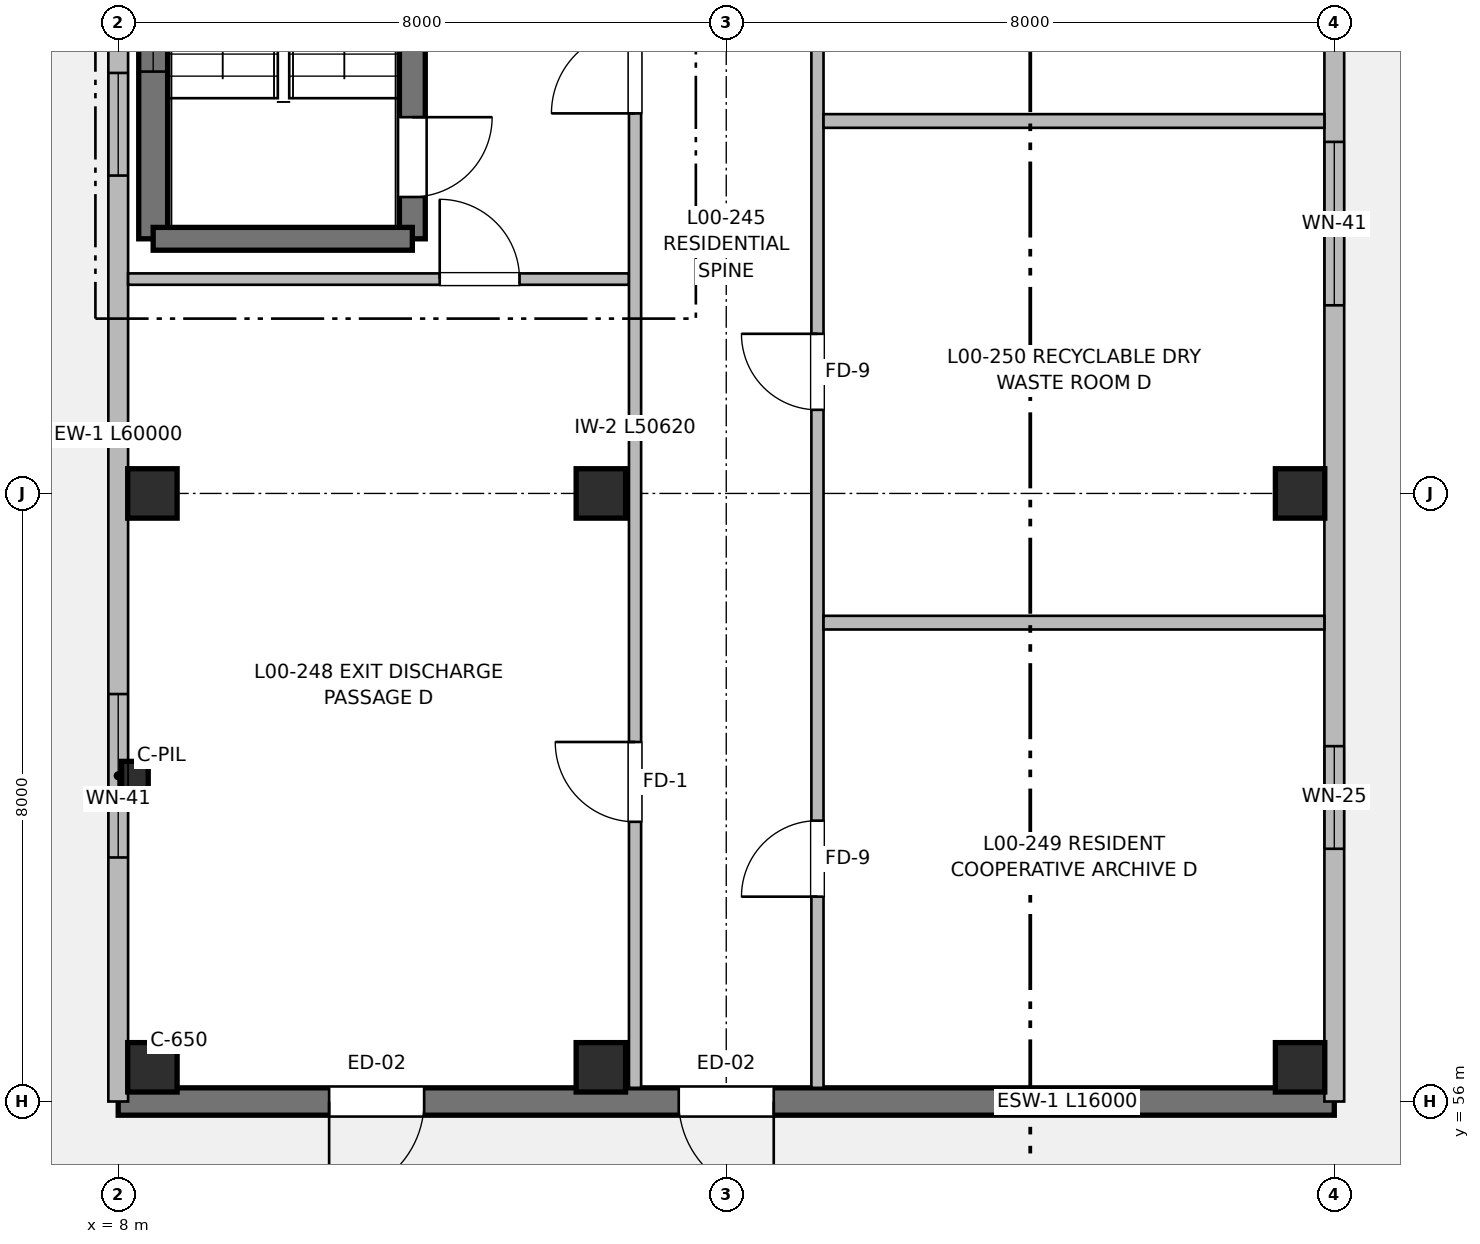
"""IFC4 building model, lengths in metres.
Left out: names, types, materials, properties, quantities, classifications, styles, units other than length and angle.
Written with IfcOpenShell. Run it as: python <this file> out.ifc"""

import sys

from ifc_helpers import new_model, si_unit, direction, frame, frame_2d, origin, origin_2d, place, context, subcontext, project, spatial, rectangle, extrude, element, fill, save


model = new_model("IFC4")
c1 = context("Model", 3, precision=1e-05, world=origin(), true_north=direction((0.0, 1.0)))
c2 = subcontext(c1, "Body", "Model", "MODEL_VIEW")
j1 = project(units=[si_unit("LENGTHUNIT", "METRE"), si_unit("PLANEANGLEUNIT", "RADIAN")], contexts=[c1])
p1 = place(None, origin())
s1 = spatial("IfcSite", under=j1, at=p1, CompositionType="ELEMENT")
p2 = place(p1, origin())
s2 = spatial("IfcBuilding", under=s1, at=p2, CompositionType="ELEMENT")
p3 = place(p2, origin())
s3 = spatial("IfcBuildingStorey", under=s2, at=p3, CompositionType="ELEMENT", Elevation=0.0)
p4 = place(p3, frame((8.22, 60.2, 0.0), z_axis=(0.0, 0.0, 1.0), x_axis=(1.0, 0.0, 0.0)))
e1 = element("IfcColumn", 1, at=p4, inside=s3, PredefinedType="PILASTER", context=c2, shape_type="SweptSolid", body=[
    extrude(rectangle(XDim=0.35, YDim=0.55, at=origin_2d()), origin(), (0.0, 0.0, 1.0), 4.16),
])
for number, where, z_axis, x_axis in (
    (2, (8.45, 56.45, 0.0), (0.0, 0.0, 1.0), (1.0, 0.0, 0.0)),
    (3, (8.45, 64.0, 0.0), (0.0, 0.0, 1.0), (1.0, 0.0, 0.0)),
    (4, (14.35, 56.45, 0.0), (0.0, 0.0, 1.0), (1.0, 0.0, 0.0)),
    (5, (14.35, 64.0, 0.0), (0.0, 0.0, 1.0), (1.0, 0.0, 0.0)),
    (6, (23.55, 56.45, 0.0), (0.0, 0.0, 1.0), (1.0, 0.0, 0.0)),
    (7, (23.55, 64.0, 0.0), (0.0, 0.0, 1.0), (1.0, 0.0, 0.0)),
):
    element("IfcColumn", number, at=place(p3, frame(where, z_axis=z_axis, x_axis=x_axis)), inside=s3, PredefinedType="COLUMN", context=c2, shape_type="SweptSolid", body=[
        extrude(rectangle(XDim=0.65, YDim=0.65, at=origin_2d()), origin(), (0.0, 0.0, 1.0), 4.16),
    ])
p5 = place(p3, frame((8.46, 67.35, 0.0), z_axis=(0.0, 0.0, 1.0), x_axis=(0.0, 1.0, 0.0)))
e8 = element("IfcWall", 8, at=p5, inside=s3, PredefinedType="SHEAR", context=c2, shape_type="SweptSolid", body=[
    extrude(rectangle(XDim=12.45, YDim=0.38, at=frame_2d((6.225, 0.0))), origin(), (0.0, 0.0, 1.0), 4.16),
])
p6 = place(p5, frame((2.2, 0.0, 1.2)))
e9 = element("IfcOpeningElement", 9, at=p6, cuts=e8, PredefinedType="OPENING", context=c2, shape_type="SweptSolid", body=[
    extrude(rectangle(XDim=0.95, YDim=1.25, at=frame_2d((0.475, 0.625))), frame((0.0, 0.2, 0.0), z_axis=(0.0, -1.0, 0.0), x_axis=(1.0, 0.0, 0.0)), (0.0, 0.0, 1.0), 0.4),
])
p7 = place(p3, frame((11.87, 79.8, 0.0), z_axis=(0.0, 0.0, 1.0), x_axis=(0.0, -1.0, 0.0)))
e10 = element("IfcWall", 10, at=p7, inside=s3, PredefinedType="SHEAR", context=c2, shape_type="SweptSolid", body=[
    extrude(rectangle(XDim=12.45, YDim=0.34, at=frame_2d((6.225, 0.0))), origin(), (0.0, 0.0, 1.0), 4.16),
])
p8 = place(p7, frame((10.85, 0.0, 0.0)))
e11 = element("IfcOpeningElement", 11, at=p8, cuts=e10, PredefinedType="OPENING", context=c2, shape_type="SweptSolid", body=[
    extrude(rectangle(XDim=1.05, YDim=2.15, at=frame_2d((0.525, 1.075))), frame((0.0, 0.18, 0.0), z_axis=(0.0, -1.0, 0.0), x_axis=(1.0, 0.0, 0.0)), (0.0, 0.0, 1.0), 0.36),
])
p9 = place(p3, frame((11.87, 67.35, 0.0), z_axis=(0.0, 0.0, 1.0), x_axis=(-1.0, 0.0, 0.0)))
e12 = element("IfcWall", 12, at=p9, inside=s3, PredefinedType="SHEAR", context=c2, shape_type="SweptSolid", body=[
    extrude(rectangle(XDim=3.41, YDim=0.3, at=frame_2d((1.705, 0.0))), origin(), (0.0, 0.0, 1.0), 4.16),
])
p10 = place(p3, frame((24.0, 56.0, 0.0), z_axis=(0.0, 0.0, 1.0), x_axis=(-1.0, 0.0, 0.0)))
e13 = element("IfcWall", 13, at=p10, inside=s3, PredefinedType="SHEAR", context=c2, shape_type="SweptSolid", body=[
    extrude(rectangle(XDim=16.0, YDim=0.36, at=frame_2d((8.0, 0.0))), origin(), (0.0, 0.0, 1.0), 3.94),
])
p11 = place(p10, frame((7.375, 0.0, 0.0)))
e14 = element("IfcOpeningElement", 14, at=p11, cuts=e13, PredefinedType="OPENING", context=c2, shape_type="SweptSolid", body=[
    extrude(rectangle(XDim=1.25, YDim=2.2, at=frame_2d((0.625, 1.1))), frame((0.0, 0.19, 0.0), z_axis=(0.0, -1.0, 0.0), x_axis=(1.0, 0.0, 0.0)), (0.0, 0.0, 1.0), 0.38),
])
p12 = place(p10, frame((11.975, 0.0, 0.0)))
e15 = element("IfcOpeningElement", 15, at=p12, cuts=e13, PredefinedType="OPENING", context=c2, shape_type="SweptSolid", body=[
    extrude(rectangle(XDim=1.25, YDim=2.2, at=frame_2d((0.625, 1.1))), frame((0.0, 0.19, 0.0), z_axis=(0.0, -1.0, 0.0), x_axis=(1.0, 0.0, 0.0)), (0.0, 0.0, 1.0), 0.38),
])
p13 = place(p3, frame((24.0, 88.0, 0.0), z_axis=(0.0, 0.0, 1.0), x_axis=(0.0, -1.0, 0.0)))
e16 = element("IfcWall", 16, at=p13, inside=s3, PredefinedType="SOLIDWALL", context=c2, shape_type="SweptSolid", body=[
    extrude(rectangle(XDim=32.0, YDim=0.26, at=frame_2d((16.0, 0.0))), origin(), (0.0, 0.0, 1.0), 3.94),
])
p14 = place(p13, frame((3.3, 0.0, 0.0)))
e17 = element("IfcOpeningElement", 17, at=p14, cuts=e16, PredefinedType="OPENING", context=c2, shape_type="SweptSolid", body=[
    extrude(rectangle(XDim=1.3, YDim=2.2, at=frame_2d((0.65, 1.1))), frame((0.0, 0.14, 0.0), z_axis=(0.0, -1.0, 0.0), x_axis=(1.0, 0.0, 0.0)), (0.0, 0.0, 1.0), 0.28),
])
p15 = place(p13, frame((10.875, 0.0, 0.95)))
e18 = element("IfcOpeningElement", 18, at=p15, cuts=e16, PredefinedType="OPENING", context=c2, shape_type="SweptSolid", body=[
    extrude(rectangle(XDim=1.35, YDim=1.3, at=frame_2d((0.675, 0.65))), frame((0.0, 0.14, 0.0), z_axis=(0.0, -1.0, 0.0), x_axis=(1.0, 0.0, 0.0)), (0.0, 0.0, 1.0), 0.28),
])
p16 = place(p13, frame((19.375, 0.0, 0.95)))
e19 = element("IfcOpeningElement", 19, at=p16, cuts=e16, PredefinedType="OPENING", context=c2, shape_type="SweptSolid", body=[
    extrude(rectangle(XDim=2.15, YDim=1.8, at=frame_2d((1.075, 0.9))), frame((0.0, 0.14, 0.0), z_axis=(0.0, -1.0, 0.0), x_axis=(1.0, 0.0, 0.0)), (0.0, 0.0, 1.0), 0.28),
])
p17 = place(p13, frame((27.325, 0.0, 0.95)))
e20 = element("IfcOpeningElement", 20, at=p17, cuts=e16, PredefinedType="OPENING", context=c2, shape_type="SweptSolid", body=[
    extrude(rectangle(XDim=1.35, YDim=1.3, at=frame_2d((0.675, 0.65))), frame((0.0, 0.14, 0.0), z_axis=(0.0, -1.0, 0.0), x_axis=(1.0, 0.0, 0.0)), (0.0, 0.0, 1.0), 0.28),
])
p18 = place(p3, frame((8.0, 56.0, 0.0), z_axis=(0.0, 0.0, 1.0), x_axis=(0.0, 1.0, 0.0)))
e21 = element("IfcWall", 21, at=p18, inside=s3, PredefinedType="SOLIDWALL", context=c2, shape_type="SweptSolid", body=[
    extrude(rectangle(XDim=60.0, YDim=0.26, at=frame_2d((30.0, 0.0))), origin(), (0.0, 0.0, 1.0), 3.94),
])
p19 = place(p18, frame((3.211, 0.0, 0.95)))
e22 = element("IfcOpeningElement", 22, at=p19, cuts=e21, PredefinedType="OPENING", context=c2, shape_type="SweptSolid", body=[
    extrude(rectangle(XDim=2.15, YDim=1.8, at=frame_2d((1.075, 0.9))), frame((0.0, 0.14, 0.0), z_axis=(0.0, -1.0, 0.0), x_axis=(1.0, 0.0, 0.0)), (0.0, 0.0, 1.0), 0.28),
])
p20 = place(p18, frame((12.182, 0.0, 0.95)))
e23 = element("IfcOpeningElement", 23, at=p20, cuts=e21, PredefinedType="OPENING", context=c2, shape_type="SweptSolid", body=[
    extrude(rectangle(XDim=1.35, YDim=1.3, at=frame_2d((0.675, 0.65))), frame((0.0, 0.14, 0.0), z_axis=(0.0, -1.0, 0.0), x_axis=(1.0, 0.0, 0.0)), (0.0, 0.0, 1.0), 0.28),
])
p21 = place(p18, frame((19.054, 0.0, 0.95)))
e24 = element("IfcOpeningElement", 24, at=p21, cuts=e21, PredefinedType="OPENING", context=c2, shape_type="SweptSolid", body=[
    extrude(rectangle(XDim=2.15, YDim=1.8, at=frame_2d((1.075, 0.9))), frame((0.0, 0.14, 0.0), z_axis=(0.0, -1.0, 0.0), x_axis=(1.0, 0.0, 0.0)), (0.0, 0.0, 1.0), 0.28),
])
p22 = place(p18, frame((29.325, 0.0, 0.95)))
e25 = element("IfcOpeningElement", 25, at=p22, cuts=e21, PredefinedType="OPENING", context=c2, shape_type="SweptSolid", body=[
    extrude(rectangle(XDim=1.35, YDim=1.3, at=frame_2d((0.675, 0.65))), frame((0.0, 0.14, 0.0), z_axis=(0.0, -1.0, 0.0), x_axis=(1.0, 0.0, 0.0)), (0.0, 0.0, 1.0), 0.28),
])
p23 = place(p18, frame((37.496, 0.0, 0.95)))
e26 = element("IfcOpeningElement", 26, at=p23, cuts=e21, PredefinedType="OPENING", context=c2, shape_type="SweptSolid", body=[
    extrude(rectangle(XDim=2.15, YDim=1.8, at=frame_2d((1.075, 0.9))), frame((0.0, 0.14, 0.0), z_axis=(0.0, -1.0, 0.0), x_axis=(1.0, 0.0, 0.0)), (0.0, 0.0, 1.0), 0.28),
])
p24 = place(p18, frame((46.468, 0.0, 0.95)))
e27 = element("IfcOpeningElement", 27, at=p24, cuts=e21, PredefinedType="OPENING", context=c2, shape_type="SweptSolid", body=[
    extrude(rectangle(XDim=1.35, YDim=1.3, at=frame_2d((0.675, 0.65))), frame((0.0, 0.14, 0.0), z_axis=(0.0, -1.0, 0.0), x_axis=(1.0, 0.0, 0.0)), (0.0, 0.0, 1.0), 0.28),
])
p25 = place(p18, frame((54.639, 0.0, 0.95)))
e28 = element("IfcOpeningElement", 28, at=p25, cuts=e21, PredefinedType="OPENING", context=c2, shape_type="SweptSolid", body=[
    extrude(rectangle(XDim=2.15, YDim=1.8, at=frame_2d((1.075, 0.9))), frame((0.0, 0.14, 0.0), z_axis=(0.0, -1.0, 0.0), x_axis=(1.0, 0.0, 0.0)), (0.0, 0.0, 1.0), 0.28),
])
p26 = place(p3, frame((8.13, 66.82, 0.0), z_axis=(0.0, 0.0, 1.0), x_axis=(1.0, 0.0, 0.0)))
e29 = element("IfcWall", 29, at=p26, inside=s3, PredefinedType="PARTITIONING", context=c2, shape_type="SweptSolid", body=[
    extrude(rectangle(XDim=6.59, YDim=0.15, at=frame_2d((3.295, 0.0))), origin(), (0.0, 0.0, 1.0), 3.895),
])
p27 = place(p26, frame((4.1, 0.0, 0.0)))
e30 = element("IfcOpeningElement", 30, at=p27, cuts=e29, PredefinedType="OPENING", context=c2, shape_type="SweptSolid", body=[
    extrude(rectangle(XDim=1.05, YDim=2.15, at=frame_2d((0.525, 1.075))), frame((0.0, 0.085, 0.0), z_axis=(0.0, -1.0, 0.0), x_axis=(1.0, 0.0, 0.0)), (0.0, 0.0, 1.0), 0.17),
])
p28 = place(p3, frame((14.8, 56.18, 0.0), z_axis=(0.0, 0.0, 1.0), x_axis=(0.0, 1.0, 0.0)))
e31 = element("IfcWall", 31, at=p28, inside=s3, PredefinedType="PARTITIONING", context=c2, shape_type="SweptSolid", body=[
    extrude(rectangle(XDim=50.62, YDim=0.16, at=frame_2d((25.31, 0.0))), origin(), (0.0, 0.0, 1.0), 3.895),
])
p29 = place(p28, frame((12.82, 0.0, 0.0)))
e32 = element("IfcOpeningElement", 32, at=p29, cuts=e31, PredefinedType="OPENING", context=c2, shape_type="SweptSolid", body=[
    extrude(rectangle(XDim=1.1, YDim=2.15, at=frame_2d((0.55, 1.075))), frame((0.0, 0.09, 0.0), z_axis=(0.0, -1.0, 0.0), x_axis=(1.0, 0.0, 0.0)), (0.0, 0.0, 1.0), 0.18),
])
p30 = place(p28, frame((19.22, 0.0, 0.0)))
e33 = element("IfcOpeningElement", 33, at=p30, cuts=e31, PredefinedType="OPENING", context=c2, shape_type="SweptSolid", body=[
    extrude(rectangle(XDim=1.6, YDim=2.15, at=frame_2d((0.8, 1.075))), frame((0.0, 0.09, 0.0), z_axis=(0.0, -1.0, 0.0), x_axis=(1.0, 0.0, 0.0)), (0.0, 0.0, 1.0), 0.18),
])
p31 = place(p28, frame((3.5, 0.0, 0.0)))
e34 = element("IfcOpeningElement", 34, at=p31, cuts=e31, PredefinedType="OPENING", context=c2, shape_type="SweptSolid", body=[
    extrude(rectangle(XDim=1.05, YDim=2.15, at=frame_2d((0.525, 1.075))), frame((0.0, 0.09, 0.0), z_axis=(0.0, -1.0, 0.0), x_axis=(1.0, 0.0, 0.0)), (0.0, 0.0, 1.0), 0.18),
])
p32 = place(p28, frame((29.2, 0.0, 0.0)))
e35 = element("IfcOpeningElement", 35, at=p32, cuts=e31, PredefinedType="OPENING", context=c2, shape_type="SweptSolid", body=[
    extrude(rectangle(XDim=1.55, YDim=2.2, at=frame_2d((0.775, 1.1))), frame((0.0, 0.09, 0.0), z_axis=(0.0, -1.0, 0.0), x_axis=(1.0, 0.0, 0.0)), (0.0, 0.0, 1.0), 0.18),
])
p33 = place(p3, frame((17.2, 56.18, 0.0), z_axis=(0.0, 0.0, 1.0), x_axis=(0.0, 1.0, 0.0)))
e36 = element("IfcWall", 36, at=p33, inside=s3, PredefinedType="PARTITIONING", context=c2, shape_type="SweptSolid", body=[
    extrude(rectangle(XDim=50.62, YDim=0.16, at=frame_2d((25.31, 0.0))), origin(), (0.0, 0.0, 1.0), 3.895),
])
p34 = place(p33, frame((2.515, 0.0, 0.0)))
e37 = element("IfcOpeningElement", 37, at=p34, cuts=e36, PredefinedType="OPENING", context=c2, shape_type="SweptSolid", body=[
    extrude(rectangle(XDim=1.0, YDim=2.1, at=frame_2d((0.5, 1.05))), frame((0.0, 0.09, 0.0), z_axis=(0.0, -1.0, 0.0), x_axis=(1.0, 0.0, 0.0)), (0.0, 0.0, 1.0), 0.18),
])
p35 = place(p33, frame((8.92, 0.0, 0.0)))
e38 = element("IfcOpeningElement", 38, at=p35, cuts=e36, PredefinedType="OPENING", context=c2, shape_type="SweptSolid", body=[
    extrude(rectangle(XDim=1.0, YDim=2.1, at=frame_2d((0.5, 1.05))), frame((0.0, 0.09, 0.0), z_axis=(0.0, -1.0, 0.0), x_axis=(1.0, 0.0, 0.0)), (0.0, 0.0, 1.0), 0.18),
])
p36 = place(p33, frame((15.42, 0.0, 0.0)))
e39 = element("IfcOpeningElement", 39, at=p36, cuts=e36, PredefinedType="OPENING", context=c2, shape_type="SweptSolid", body=[
    extrude(rectangle(XDim=1.0, YDim=2.1, at=frame_2d((0.5, 1.05))), frame((0.0, 0.09, 0.0), z_axis=(0.0, -1.0, 0.0), x_axis=(1.0, 0.0, 0.0)), (0.0, 0.0, 1.0), 0.18),
])
p37 = place(p33, frame((24.42, 0.0, 0.0)))
e40 = element("IfcOpeningElement", 40, at=p37, cuts=e36, PredefinedType="OPENING", context=c2, shape_type="SweptSolid", body=[
    extrude(rectangle(XDim=0.96, YDim=2.15, at=frame_2d((0.48, 1.075))), frame((0.0, 0.09, 0.0), z_axis=(0.0, -1.0, 0.0), x_axis=(1.0, 0.0, 0.0)), (0.0, 0.0, 1.0), 0.18),
])
p38 = place(p33, frame((40.175, 0.0, 0.0)))
e41 = element("IfcOpeningElement", 41, at=p38, cuts=e36, PredefinedType="OPENING", context=c2, shape_type="SweptSolid", body=[
    extrude(rectangle(XDim=1.04, YDim=2.15, at=frame_2d((0.52, 1.075))), frame((0.0, 0.09, 0.0), z_axis=(0.0, -1.0, 0.0), x_axis=(1.0, 0.0, 0.0)), (0.0, 0.0, 1.0), 0.18),
])
for number, where, z_axis, x_axis in (
    (42, (17.28, 62.3, 0.0), (0.0, 0.0, 1.0), (1.0, 0.0, 0.0)),
    (43, (17.28, 68.9, 0.0), (0.0, 0.0, 1.0), (1.0, 0.0, 0.0)),
):
    element("IfcWall", number, at=place(p3, frame(where, z_axis=z_axis, x_axis=x_axis)), inside=s3, PredefinedType="PARTITIONING", context=c2, shape_type="SweptSolid", body=[
        extrude(rectangle(XDim=6.59, YDim=0.18, at=frame_2d((3.295, 0.0))), origin(), (0.0, 0.0, 1.0), 3.895),
    ])
p39 = place(p8, origin())
e44 = element("IfcDoor", 44, at=p39, inside=s3, OperationType="SINGLE_SWING_LEFT", PredefinedType="DOOR", context=c2, shape_type="SweptSolid", body=[
    extrude(rectangle(XDim=1.05, YDim=2.15, at=frame_2d((0.525, 1.075))), frame((0.0, 0.025, 0.0), z_axis=(0.0, -1.0, 0.0), x_axis=(1.0, 0.0, 0.0)), (0.0, 0.0, 1.0), 0.05),
])
fill(e11, e44)
p40 = place(p6, origin())
e45 = element("IfcWindow", 45, at=p40, inside=s3, PartitioningType="SINGLE_PANEL", PredefinedType="WINDOW", context=c2, shape_type="SweptSolid", body=[
    extrude(rectangle(XDim=0.95, YDim=1.25, at=frame_2d((0.475, 0.625))), frame((0.0, 0.03, 0.0), z_axis=(0.0, -1.0, 0.0), x_axis=(1.0, 0.0, 0.0)), (0.0, 0.0, 1.0), 0.06),
])
fill(e9, e45)
p41 = place(p11, origin())
e46 = element("IfcDoor", 46, at=p41, inside=s3, OperationType="SINGLE_SWING_LEFT", PredefinedType="DOOR", context=c2, shape_type="SweptSolid", body=[
    extrude(rectangle(XDim=1.25, YDim=2.2, at=frame_2d((0.625, 1.1))), frame((0.0, 0.025, 0.0), z_axis=(0.0, -1.0, 0.0), x_axis=(1.0, 0.0, 0.0)), (0.0, 0.0, 1.0), 0.05),
])
fill(e14, e46)
p42 = place(p12, origin())
e47 = element("IfcDoor", 47, at=p42, inside=s3, OperationType="SINGLE_SWING_RIGHT", PredefinedType="DOOR", context=c2, shape_type="SweptSolid", body=[
    extrude(rectangle(XDim=1.25, YDim=2.2, at=frame_2d((0.625, 1.1))), frame((0.0, 0.025, 0.0), z_axis=(0.0, -1.0, 0.0), x_axis=(1.0, 0.0, 0.0)), (0.0, 0.0, 1.0), 0.05),
])
fill(e15, e47)
p43 = place(p16, origin())
e48 = element("IfcWindow", 48, at=p43, inside=s3, PartitioningType="SINGLE_PANEL", PredefinedType="WINDOW", context=c2, shape_type="SweptSolid", body=[
    extrude(rectangle(XDim=2.15, YDim=1.8, at=frame_2d((1.075, 0.9))), frame((0.0, 0.03, 0.0), z_axis=(0.0, -1.0, 0.0), x_axis=(1.0, 0.0, 0.0)), (0.0, 0.0, 1.0), 0.06),
])
fill(e19, e48)
p44 = place(p17, origin())
e49 = element("IfcWindow", 49, at=p44, inside=s3, PartitioningType="SINGLE_PANEL", PredefinedType="WINDOW", context=c2, shape_type="SweptSolid", body=[
    extrude(rectangle(XDim=1.35, YDim=1.3, at=frame_2d((0.675, 0.65))), frame((0.0, 0.03, 0.0), z_axis=(0.0, -1.0, 0.0), x_axis=(1.0, 0.0, 0.0)), (0.0, 0.0, 1.0), 0.06),
])
fill(e20, e49)
p45 = place(p19, origin())
e50 = element("IfcWindow", 50, at=p45, inside=s3, PartitioningType="SINGLE_PANEL", PredefinedType="WINDOW", context=c2, shape_type="SweptSolid", body=[
    extrude(rectangle(XDim=2.15, YDim=1.8, at=frame_2d((1.075, 0.9))), frame((0.0, 0.03, 0.0), z_axis=(0.0, -1.0, 0.0), x_axis=(1.0, 0.0, 0.0)), (0.0, 0.0, 1.0), 0.06),
])
fill(e22, e50)
p46 = place(p20, origin())
e51 = element("IfcWindow", 51, at=p46, inside=s3, PartitioningType="SINGLE_PANEL", PredefinedType="WINDOW", context=c2, shape_type="SweptSolid", body=[
    extrude(rectangle(XDim=1.35, YDim=1.3, at=frame_2d((0.675, 0.65))), frame((0.0, 0.03, 0.0), z_axis=(0.0, -1.0, 0.0), x_axis=(1.0, 0.0, 0.0)), (0.0, 0.0, 1.0), 0.06),
])
fill(e23, e51)
p47 = place(p29, origin())
e52 = element("IfcDoor", 52, at=p47, inside=s3, OperationType="SINGLE_SWING_LEFT", PredefinedType="DOOR", context=c2, shape_type="SweptSolid", body=[
    extrude(rectangle(XDim=1.1, YDim=2.15, at=frame_2d((0.55, 1.075))), frame((0.0, 0.025, 0.0), z_axis=(0.0, -1.0, 0.0), x_axis=(1.0, 0.0, 0.0)), (0.0, 0.0, 1.0), 0.05),
])
fill(e32, e52)
p48 = place(p27, origin())
e53 = element("IfcDoor", 53, at=p48, inside=s3, OperationType="SINGLE_SWING_LEFT", PredefinedType="DOOR", context=c2, shape_type="SweptSolid", body=[
    extrude(rectangle(XDim=1.05, YDim=2.15, at=frame_2d((0.525, 1.075))), frame((0.0, 0.025, 0.0), z_axis=(0.0, -1.0, 0.0), x_axis=(1.0, 0.0, 0.0)), (0.0, 0.0, 1.0), 0.05),
])
fill(e30, e53)
p49 = place(p31, origin())
e54 = element("IfcDoor", 54, at=p49, inside=s3, OperationType="SINGLE_SWING_RIGHT", PredefinedType="DOOR", context=c2, shape_type="SweptSolid", body=[
    extrude(rectangle(XDim=1.05, YDim=2.15, at=frame_2d((0.525, 1.075))), frame((0.0, 0.025, 0.0), z_axis=(0.0, -1.0, 0.0), x_axis=(1.0, 0.0, 0.0)), (0.0, 0.0, 1.0), 0.05),
])
fill(e34, e54)
p50 = place(p34, origin())
e55 = element("IfcDoor", 55, at=p50, inside=s3, OperationType="SINGLE_SWING_LEFT", PredefinedType="DOOR", context=c2, shape_type="SweptSolid", body=[
    extrude(rectangle(XDim=1.0, YDim=2.1, at=frame_2d((0.5, 1.05))), frame((0.0, 0.025, 0.0), z_axis=(0.0, -1.0, 0.0), x_axis=(1.0, 0.0, 0.0)), (0.0, 0.0, 1.0), 0.05),
])
fill(e37, e55)
p51 = place(p35, origin())
e56 = element("IfcDoor", 56, at=p51, inside=s3, OperationType="SINGLE_SWING_RIGHT", PredefinedType="DOOR", context=c2, shape_type="SweptSolid", body=[
    extrude(rectangle(XDim=1.0, YDim=2.1, at=frame_2d((0.5, 1.05))), frame((0.0, 0.025, 0.0), z_axis=(0.0, -1.0, 0.0), x_axis=(1.0, 0.0, 0.0)), (0.0, 0.0, 1.0), 0.05),
])
fill(e38, e56)
save(model, sys.argv[1])
